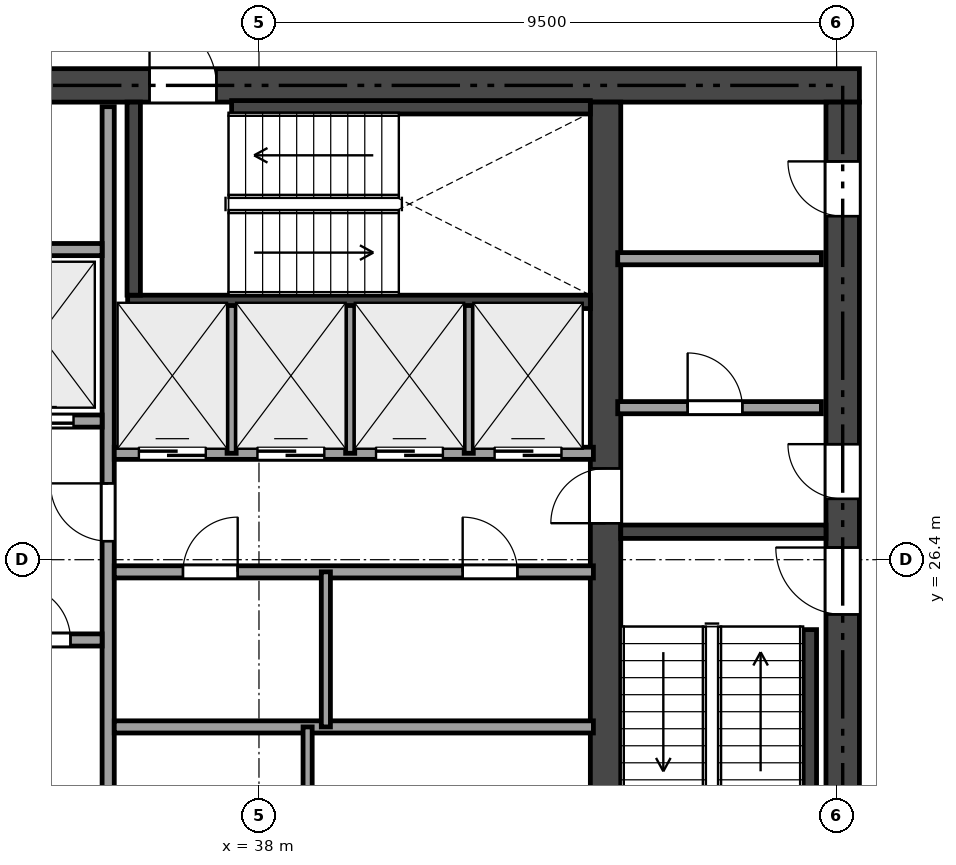
"""IFC4 building model, lengths in metres.
Left out: names, types, materials, properties, quantities, classifications, styles, units other than length and angle.
Written with IfcOpenShell. Run it as: python <this file> out.ifc"""

import sys

from ifc_helpers import new_model, si_unit, direction, frame, frame_2d, origin, place, context, subcontext, project, spatial, rectangle, extrude, element, fill, save


model = new_model("IFC4")
c1 = context("Model", 3, precision=1e-05, world=origin(), true_north=direction((0.0, 1.0)))
c2 = subcontext(c1, "Body", "Model", "MODEL_VIEW")
j1 = project(units=[si_unit("LENGTHUNIT", "METRE"), si_unit("PLANEANGLEUNIT", "RADIAN")], contexts=[c1])
p1 = place(None, origin())
s1 = spatial("IfcSite", under=j1, at=p1, CompositionType="ELEMENT")
p2 = place(p1, origin())
s2 = spatial("IfcBuilding", under=s1, at=p2, CompositionType="ELEMENT")
p3 = place(p2, frame((0.0, 0.0, 231.9)))
s3 = spatial("IfcBuildingStorey", under=s2, at=p3, CompositionType="ELEMENT", Elevation=231.9)
p4 = place(p3, frame((26.525, 34.2, 0.0), z_axis=(0.0, 0.0, 1.0), x_axis=(1.0, 0.0, 0.0)))
e1 = element("IfcWall", 1, at=p4, inside=s3, PredefinedType="SHEAR", context=c2, shape_type="SweptSolid", body=[
    extrude(rectangle(XDim=21.35, YDim=0.55, at=frame_2d((10.675, 0.0))), origin(), (0.0, 0.0, 1.0), 3.18),
])
p5 = place(p4, frame((9.675, 0.0, 0.0)))
e2 = element("IfcOpeningElement", 2, at=p5, cuts=e1, PredefinedType="OPENING", context=c2, shape_type="SweptSolid", body=[
    extrude(rectangle(XDim=1.1, YDim=2.15, at=frame_2d((0.55, 1.075))), frame((0.0, 0.285, 0.0), z_axis=(0.0, -1.0, 0.0), x_axis=(1.0, 0.0, 0.0)), (0.0, 0.0, 1.0), 0.57),
])
p6 = place(p4, frame((1.925, 0.0, 0.0)))
e3 = element("IfcOpeningElement", 3, at=p6, cuts=e1, PredefinedType="OPENING", context=c2, shape_type="SweptSolid", body=[
    extrude(rectangle(XDim=0.9, YDim=2.1, at=frame_2d((0.45, 1.05))), frame((0.0, 0.285, 0.0), z_axis=(0.0, -1.0, 0.0), x_axis=(1.0, 0.0, 0.0)), (0.0, 0.0, 1.0), 0.57),
])
p7 = place(p4, frame((6.225, 0.0, 0.0)))
e4 = element("IfcOpeningElement", 4, at=p7, cuts=e1, PredefinedType="OPENING", context=c2, shape_type="SweptSolid", body=[
    extrude(rectangle(XDim=0.9, YDim=2.1, at=frame_2d((0.45, 1.05))), frame((0.0, 0.285, 0.0), z_axis=(0.0, -1.0, 0.0), x_axis=(1.0, 0.0, 0.0)), (0.0, 0.0, 1.0), 0.57),
])
p8 = place(p3, frame((47.6, 18.875, 0.0), z_axis=(0.0, 0.0, 1.0), x_axis=(0.0, 1.0, 0.0)))
e5 = element("IfcWall", 5, at=p8, inside=s3, PredefinedType="SHEAR", context=c2, shape_type="SweptSolid", body=[
    extrude(rectangle(XDim=15.05, YDim=0.55, at=frame_2d((7.525, 0.0))), origin(), (0.0, 0.0, 1.0), 3.18),
])
p9 = place(p8, frame((6.625, 0.0, 0.0)))
e6 = element("IfcOpeningElement", 6, at=p9, cuts=e5, PredefinedType="OPENING", context=c2, shape_type="SweptSolid", body=[
    extrude(rectangle(XDim=1.1, YDim=2.15, at=frame_2d((0.55, 1.075))), frame((0.0, 0.285, 0.0), z_axis=(0.0, -1.0, 0.0), x_axis=(1.0, 0.0, 0.0)), (0.0, 0.0, 1.0), 0.57),
])
p10 = place(p8, frame((8.525, 0.0, 0.0)))
e7 = element("IfcOpeningElement", 7, at=p10, cuts=e5, PredefinedType="OPENING", context=c2, shape_type="SweptSolid", body=[
    extrude(rectangle(XDim=0.9, YDim=2.1, at=frame_2d((0.45, 1.05))), frame((0.0, 0.285, 0.0), z_axis=(0.0, -1.0, 0.0), x_axis=(1.0, 0.0, 0.0)), (0.0, 0.0, 1.0), 0.57),
])
p11 = place(p8, frame((13.175, 0.0, 0.0)))
e8 = element("IfcOpeningElement", 8, at=p11, cuts=e5, PredefinedType="OPENING", context=c2, shape_type="SweptSolid", body=[
    extrude(rectangle(XDim=0.9, YDim=2.1, at=frame_2d((0.45, 1.05))), frame((0.0, 0.285, 0.0), z_axis=(0.0, -1.0, 0.0), x_axis=(1.0, 0.0, 0.0)), (0.0, 0.0, 1.0), 0.57),
])
p12 = place(p3, frame((43.7, 18.875, 0.0), z_axis=(0.0, 0.0, 1.0), x_axis=(0.0, 1.0, 0.0)))
e9 = element("IfcWall", 9, at=p12, inside=s3, PredefinedType="SHEAR", context=c2, shape_type="SweptSolid", body=[
    extrude(rectangle(XDim=15.05, YDim=0.5, at=frame_2d((7.525, 0.0))), origin(), (0.0, 0.0, 1.0), 3.18),
])
p13 = place(p12, frame((8.125, 0.0, 0.0)))
e10 = element("IfcOpeningElement", 10, at=p13, cuts=e9, PredefinedType="OPENING", context=c2, shape_type="SweptSolid", body=[
    extrude(rectangle(XDim=0.9, YDim=2.1, at=frame_2d((0.45, 1.05))), frame((0.0, 0.26, 0.0), z_axis=(0.0, -1.0, 0.0), x_axis=(1.0, 0.0, 0.0)), (0.0, 0.0, 1.0), 0.52),
])
p14 = place(p3, frame((43.95, 26.86, 0.0), z_axis=(0.0, 0.0, 1.0), x_axis=(1.0, 0.0, 0.0)))
e11 = element("IfcWall", 11, at=p14, inside=s3, PredefinedType="SHEAR", context=c2, shape_type="SweptSolid", body=[
    extrude(rectangle(XDim=3.375, YDim=0.22, at=frame_2d((1.688, 0.0))), origin(), (0.0, 0.0, 1.0), 3.18),
])
p15 = place(p3, frame((47.06, 19.35, 0.0), z_axis=(0.0, 0.0, 1.0), x_axis=(0.0, 1.0, 0.0)))
e12 = element("IfcWall", 12, at=p15, inside=s3, PredefinedType="SHEAR", context=c2, shape_type="SweptSolid", body=[
    extrude(rectangle(XDim=5.9, YDim=0.22, at=frame_2d((2.95, 0.0))), origin(), (0.0, 0.0, 1.0), 3.18),
])
p16 = place(p3, frame((35.84, 30.64, 0.0), z_axis=(0.0, 0.0, 1.0), x_axis=(1.0, 0.0, 0.0)))
e13 = element("IfcWall", 13, at=p16, inside=s3, PredefinedType="SHEAR", context=c2, shape_type="SweptSolid", body=[
    extrude(rectangle(XDim=7.61, YDim=0.22, at=frame_2d((3.805, 0.0))), origin(), (0.0, 0.0, 1.0), 3.18),
])
p17 = place(p3, frame((35.94, 30.75, 0.0), z_axis=(0.0, 0.0, 1.0), x_axis=(0.0, 1.0, 0.0)))
e14 = element("IfcWall", 14, at=p17, inside=s3, PredefinedType="SHEAR", context=c2, shape_type="SweptSolid", body=[
    extrude(rectangle(XDim=3.175, YDim=0.22, at=frame_2d((1.587, 0.0))), origin(), (0.0, 0.0, 1.0), 3.18),
])
p18 = place(p3, frame((37.55, 33.84, 0.0), z_axis=(0.0, 0.0, 1.0), x_axis=(1.0, 0.0, 0.0)))
e15 = element("IfcWall", 15, at=p18, inside=s3, PredefinedType="SHEAR", context=c2, shape_type="SweptSolid", body=[
    extrude(rectangle(XDim=5.9, YDim=0.22, at=frame_2d((2.95, 0.0))), origin(), (0.0, 0.0, 1.0), 3.18),
])
p19 = place(p3, frame((43.9, 28.9, 0.0), z_axis=(0.0, 0.0, 1.0), x_axis=(1.0, 0.0, 0.0)))
e16 = element("IfcWall", 16, at=p19, inside=s3, PredefinedType="SOLIDWALL", context=c2, shape_type="SweptSolid", body=[
    extrude(rectangle(XDim=3.35, YDim=0.2, at=frame_2d((1.675, 0.0))), origin(), (0.0, 0.0, 1.0), 3.18),
])
p20 = place(p19, frame((1.15, 0.0, 0.0)))
e17 = element("IfcOpeningElement", 17, at=p20, cuts=e16, PredefinedType="OPENING", context=c2, shape_type="SweptSolid", body=[
    extrude(rectangle(XDim=0.9, YDim=2.1, at=frame_2d((0.45, 1.05))), frame((0.0, 0.11, 0.0), z_axis=(0.0, -1.0, 0.0), x_axis=(1.0, 0.0, 0.0)), (0.0, 0.0, 1.0), 0.22),
])
p21 = place(p3, frame((43.9, 31.35, 0.0), z_axis=(0.0, 0.0, 1.0), x_axis=(1.0, 0.0, 0.0)))
e18 = element("IfcWall", 18, at=p21, inside=s3, PredefinedType="SOLIDWALL", context=c2, shape_type="SweptSolid", body=[
    extrude(rectangle(XDim=3.35, YDim=0.2, at=frame_2d((1.675, 0.0))), origin(), (0.0, 0.0, 1.0), 2.809),
])
p22 = place(p3, frame((35.52, 18.95, 0.0), z_axis=(0.0, 0.0, 1.0), x_axis=(0.0, 1.0, 0.0)))
e19 = element("IfcWall", 19, at=p22, inside=s3, PredefinedType="SOLIDWALL", context=c2, shape_type="SweptSolid", body=[
    extrude(rectangle(XDim=14.9, YDim=0.2, at=frame_2d((7.45, 0.0))), origin(), (0.0, 0.0, 1.0), 2.701),
])
p23 = place(p22, frame((7.755, 0.0, 0.0)))
e20 = element("IfcOpeningElement", 20, at=p23, cuts=e19, PredefinedType="OPENING", context=c2, shape_type="SweptSolid", body=[
    extrude(rectangle(XDim=0.95, YDim=2.15, at=frame_2d((0.475, 1.075))), frame((0.0, 0.11, 0.0), z_axis=(0.0, -1.0, 0.0), x_axis=(1.0, 0.0, 0.0)), (0.0, 0.0, 1.0), 0.22),
])
p24 = place(p22, frame((0.6, 0.0, 0.0)))
e21 = element("IfcOpeningElement", 21, at=p24, cuts=e19, PredefinedType="OPENING", context=c2, shape_type="SweptSolid", body=[
    extrude(rectangle(XDim=0.9, YDim=2.1, at=frame_2d((0.45, 1.05))), frame((0.0, 0.11, 0.0), z_axis=(0.0, -1.0, 0.0), x_axis=(1.0, 0.0, 0.0)), (0.0, 0.0, 1.0), 0.22),
])
p25 = place(p3, frame((31.0, 28.68, 0.0), z_axis=(0.0, 0.0, 1.0), x_axis=(1.0, 0.0, 0.0)))
e22 = element("IfcWall", 22, at=p25, inside=s3, PredefinedType="SOLIDWALL", context=c2, shape_type="SweptSolid", body=[
    extrude(rectangle(XDim=4.42, YDim=0.2, at=frame_2d((2.21, 0.0))), origin(), (0.0, 0.0, 1.0), 3.18),
])
p26 = place(p25, frame((0.6, 0.0, 0.0)))
e23 = element("IfcOpeningElement", 23, at=p26, cuts=e22, PredefinedType="OPENING", context=c2, shape_type="SweptSolid", body=[
    extrude(rectangle(XDim=1.1, YDim=2.15, at=frame_2d((0.55, 1.075))), frame((0.0, 0.11, 0.0), z_axis=(0.0, -1.0, 0.0), x_axis=(1.0, 0.0, 0.0)), (0.0, 0.0, 1.0), 0.22),
])
p27 = place(p25, frame((2.85, 0.0, 0.0)))
e24 = element("IfcOpeningElement", 24, at=p27, cuts=e22, PredefinedType="OPENING", context=c2, shape_type="SweptSolid", body=[
    extrude(rectangle(XDim=1.1, YDim=2.15, at=frame_2d((0.55, 1.075))), frame((0.0, 0.11, 0.0), z_axis=(0.0, -1.0, 0.0), x_axis=(1.0, 0.0, 0.0)), (0.0, 0.0, 1.0), 0.22),
])
p28 = place(p3, frame((31.0, 31.5, 0.0), z_axis=(0.0, 0.0, 1.0), x_axis=(1.0, 0.0, 0.0)))
e25 = element("IfcWall", 25, at=p28, inside=s3, PredefinedType="SOLIDWALL", context=c2, shape_type="SweptSolid", body=[
    extrude(rectangle(XDim=4.42, YDim=0.2, at=frame_2d((2.21, 0.0))), origin(), (0.0, 0.0, 1.0), 3.18),
])
p29 = place(p3, frame((31.0, 25.08, 0.0), z_axis=(0.0, 0.0, 1.0), x_axis=(1.0, 0.0, 0.0)))
e26 = element("IfcWall", 26, at=p29, inside=s3, PredefinedType="SOLIDWALL", context=c2, shape_type="SweptSolid", body=[
    extrude(rectangle(XDim=4.42, YDim=0.2, at=frame_2d((2.21, 0.0))), origin(), (0.0, 0.0, 1.0), 3.18),
])
p30 = place(p29, frame((3.0, 0.0, 0.0)))
e27 = element("IfcOpeningElement", 27, at=p30, cuts=e26, PredefinedType="OPENING", context=c2, shape_type="SweptSolid", body=[
    extrude(rectangle(XDim=0.9, YDim=2.1, at=frame_2d((0.45, 1.05))), frame((0.0, 0.11, 0.0), z_axis=(0.0, -1.0, 0.0), x_axis=(1.0, 0.0, 0.0)), (0.0, 0.0, 1.0), 0.22),
])
p31 = place(p29, frame((0.62, 0.0, 0.0)))
e28 = element("IfcOpeningElement", 28, at=p31, cuts=e26, PredefinedType="OPENING", context=c2, shape_type="SweptSolid", body=[
    extrude(rectangle(XDim=1.2, YDim=2.15, at=frame_2d((0.6, 1.075))), frame((0.0, 0.11, 0.0), z_axis=(0.0, -1.0, 0.0), x_axis=(1.0, 0.0, 0.0)), (0.0, 0.0, 1.0), 0.22),
])
p32 = place(p3, frame((35.62, 28.15, 0.0), z_axis=(0.0, 0.0, 1.0), x_axis=(1.0, 0.0, 0.0)))
e29 = element("IfcWall", 29, at=p32, inside=s3, PredefinedType="SOLIDWALL", context=c2, shape_type="SweptSolid", body=[
    extrude(rectangle(XDim=7.88, YDim=0.2, at=frame_2d((3.94, 0.0))), origin(), (0.0, 0.0, 1.0), 3.18),
])
p33 = place(p32, frame((0.405, 0.0, 0.0)))
e30 = element("IfcOpeningElement", 30, at=p33, cuts=e29, PredefinedType="OPENING", context=c2, shape_type="SweptSolid", body=[
    extrude(rectangle(XDim=1.1, YDim=2.15, at=frame_2d((0.55, 1.075))), frame((0.0, 0.11, 0.0), z_axis=(0.0, -1.0, 0.0), x_axis=(1.0, 0.0, 0.0)), (0.0, 0.0, 1.0), 0.22),
])
p34 = place(p32, frame((2.355, 0.0, 0.0)))
e31 = element("IfcOpeningElement", 31, at=p34, cuts=e29, PredefinedType="OPENING", context=c2, shape_type="SweptSolid", body=[
    extrude(rectangle(XDim=1.1, YDim=2.15, at=frame_2d((0.55, 1.075))), frame((0.0, 0.11, 0.0), z_axis=(0.0, -1.0, 0.0), x_axis=(1.0, 0.0, 0.0)), (0.0, 0.0, 1.0), 0.22),
])
p35 = place(p32, frame((4.305, 0.0, 0.0)))
e32 = element("IfcOpeningElement", 32, at=p35, cuts=e29, PredefinedType="OPENING", context=c2, shape_type="SweptSolid", body=[
    extrude(rectangle(XDim=1.1, YDim=2.15, at=frame_2d((0.55, 1.075))), frame((0.0, 0.11, 0.0), z_axis=(0.0, -1.0, 0.0), x_axis=(1.0, 0.0, 0.0)), (0.0, 0.0, 1.0), 0.22),
])
p36 = place(p32, frame((6.255, 0.0, 0.0)))
e33 = element("IfcOpeningElement", 33, at=p36, cuts=e29, PredefinedType="OPENING", context=c2, shape_type="SweptSolid", body=[
    extrude(rectangle(XDim=1.1, YDim=2.15, at=frame_2d((0.55, 1.075))), frame((0.0, 0.11, 0.0), z_axis=(0.0, -1.0, 0.0), x_axis=(1.0, 0.0, 0.0)), (0.0, 0.0, 1.0), 0.22),
])
p37 = place(p3, frame((35.62, 26.2, 0.0), z_axis=(0.0, 0.0, 1.0), x_axis=(1.0, 0.0, 0.0)))
e34 = element("IfcWall", 34, at=p37, inside=s3, PredefinedType="SOLIDWALL", context=c2, shape_type="SweptSolid", body=[
    extrude(rectangle(XDim=7.88, YDim=0.2, at=frame_2d((3.94, 0.0))), origin(), (0.0, 0.0, 1.0), 3.18),
])
p38 = place(p37, frame((1.13, 0.0, 0.0)))
e35 = element("IfcOpeningElement", 35, at=p38, cuts=e34, PredefinedType="OPENING", context=c2, shape_type="SweptSolid", body=[
    extrude(rectangle(XDim=0.9, YDim=2.1, at=frame_2d((0.45, 1.05))), frame((0.0, 0.11, 0.0), z_axis=(0.0, -1.0, 0.0), x_axis=(1.0, 0.0, 0.0)), (0.0, 0.0, 1.0), 0.22),
])
p39 = place(p37, frame((5.73, 0.0, 0.0)))
e36 = element("IfcOpeningElement", 36, at=p39, cuts=e34, PredefinedType="OPENING", context=c2, shape_type="SweptSolid", body=[
    extrude(rectangle(XDim=0.9, YDim=2.1, at=frame_2d((0.45, 1.05))), frame((0.0, 0.11, 0.0), z_axis=(0.0, -1.0, 0.0), x_axis=(1.0, 0.0, 0.0)), (0.0, 0.0, 1.0), 0.22),
])
p40 = place(p3, frame((35.62, 23.65, 0.0), z_axis=(0.0, 0.0, 1.0), x_axis=(1.0, 0.0, 0.0)))
e37 = element("IfcWall", 37, at=p40, inside=s3, PredefinedType="SOLIDWALL", context=c2, shape_type="SweptSolid", body=[
    extrude(rectangle(XDim=7.88, YDim=0.2, at=frame_2d((3.94, 0.0))), origin(), (0.0, 0.0, 1.0), 2.701),
])
for number, where, z_axis, x_axis in (
    (38, (37.55, 28.15, 0.0), (0.0, 0.0, 1.0), (0.0, 1.0, 0.0)),
    (39, (39.5, 28.15, 0.0), (0.0, 0.0, 1.0), (0.0, 1.0, 0.0)),
    (40, (41.45, 28.15, 0.0), (0.0, 0.0, 1.0), (0.0, 1.0, 0.0)),
):
    element("IfcWall", number, at=place(p3, frame(where, z_axis=z_axis, x_axis=x_axis)), inside=s3, PredefinedType="PARTITIONING", context=c2, shape_type="SweptSolid", body=[
        extrude(rectangle(XDim=2.43, YDim=0.15, at=frame_2d((1.215, 0.0))), origin(), (0.0, 0.0, 1.0), 3.18),
    ])
p41 = place(p3, frame((39.1, 23.65, 0.0), z_axis=(0.0, 0.0, 1.0), x_axis=(0.0, 1.0, 0.0)))
e41 = element("IfcWall", 41, at=p41, inside=s3, PredefinedType="PARTITIONING", context=c2, shape_type="SweptSolid", body=[
    extrude(rectangle(XDim=2.55, YDim=0.15, at=frame_2d((1.275, 0.0))), origin(), (0.0, 0.0, 1.0), 2.701),
])
p42 = place(p3, frame((38.8, 21.25, 0.0), z_axis=(0.0, 0.0, 1.0), x_axis=(0.0, 1.0, 0.0)))
e42 = element("IfcWall", 42, at=p42, inside=s3, PredefinedType="PARTITIONING", context=c2, shape_type="SweptSolid", body=[
    extrude(rectangle(XDim=2.4, YDim=0.15, at=frame_2d((1.2, 0.0))), origin(), (0.0, 0.0, 1.0), 2.701),
])
p43 = place(p9, origin())
e43 = element("IfcDoor", 43, at=p43, inside=s3, OperationType="SINGLE_SWING_RIGHT", PredefinedType="DOOR", context=c2, shape_type="SweptSolid", body=[
    extrude(rectangle(XDim=1.1, YDim=2.15, at=frame_2d((0.55, 1.075))), frame((0.0, 0.025, 0.0), z_axis=(0.0, -1.0, 0.0), x_axis=(1.0, 0.0, 0.0)), (0.0, 0.0, 1.0), 0.05),
])
fill(e6, e43)
p44 = place(p5, origin())
e44 = element("IfcDoor", 44, at=p44, inside=s3, OperationType="SINGLE_SWING_LEFT", PredefinedType="DOOR", context=c2, shape_type="SweptSolid", body=[
    extrude(rectangle(XDim=1.1, YDim=2.15, at=frame_2d((0.55, 1.075))), frame((0.0, 0.025, 0.0), z_axis=(0.0, -1.0, 0.0), x_axis=(1.0, 0.0, 0.0)), (0.0, 0.0, 1.0), 0.05),
])
fill(e2, e44)
p45 = place(p23, origin())
e45 = element("IfcDoor", 45, at=p45, inside=s3, OperationType="SINGLE_SWING_RIGHT", PredefinedType="DOOR", context=c2, shape_type="SweptSolid", body=[
    extrude(rectangle(XDim=0.95, YDim=2.15, at=frame_2d((0.475, 1.075))), frame((0.0, 0.025, 0.0), z_axis=(0.0, -1.0, 0.0), x_axis=(1.0, 0.0, 0.0)), (0.0, 0.0, 1.0), 0.05),
])
fill(e20, e45)
p46 = place(p13, origin())
e46 = element("IfcDoor", 46, at=p46, inside=s3, OperationType="SINGLE_SWING_LEFT", PredefinedType="DOOR", context=c2, shape_type="SweptSolid", body=[
    extrude(rectangle(XDim=0.9, YDim=2.1, at=frame_2d((0.45, 1.05))), frame((0.0, 0.025, 0.0), z_axis=(0.0, -1.0, 0.0), x_axis=(1.0, 0.0, 0.0)), (0.0, 0.0, 1.0), 0.05),
])
fill(e10, e46)
p47 = place(p10, origin())
e47 = element("IfcDoor", 47, at=p47, inside=s3, OperationType="SINGLE_SWING_RIGHT", PredefinedType="DOOR", context=c2, shape_type="SweptSolid", body=[
    extrude(rectangle(XDim=0.9, YDim=2.1, at=frame_2d((0.45, 1.05))), frame((0.0, 0.025, 0.0), z_axis=(0.0, -1.0, 0.0), x_axis=(1.0, 0.0, 0.0)), (0.0, 0.0, 1.0), 0.05),
])
fill(e7, e47)
p48 = place(p20, origin())
e48 = element("IfcDoor", 48, at=p48, inside=s3, OperationType="SINGLE_SWING_LEFT", PredefinedType="DOOR", context=c2, shape_type="SweptSolid", body=[
    extrude(rectangle(XDim=0.9, YDim=2.1, at=frame_2d((0.45, 1.05))), frame((0.0, 0.025, 0.0), z_axis=(0.0, -1.0, 0.0), x_axis=(1.0, 0.0, 0.0)), (0.0, 0.0, 1.0), 0.05),
])
fill(e17, e48)
p49 = place(p11, origin())
e49 = element("IfcDoor", 49, at=p49, inside=s3, OperationType="SINGLE_SWING_RIGHT", PredefinedType="DOOR", context=c2, shape_type="SweptSolid", body=[
    extrude(rectangle(XDim=0.9, YDim=2.1, at=frame_2d((0.45, 1.05))), frame((0.0, 0.025, 0.0), z_axis=(0.0, -1.0, 0.0), x_axis=(1.0, 0.0, 0.0)), (0.0, 0.0, 1.0), 0.05),
])
fill(e8, e49)
p50 = place(p30, origin())
e50 = element("IfcDoor", 50, at=p50, inside=s3, OperationType="SINGLE_SWING_LEFT", PredefinedType="DOOR", context=c2, shape_type="SweptSolid", body=[
    extrude(rectangle(XDim=0.9, YDim=2.1, at=frame_2d((0.45, 1.05))), frame((0.0, 0.025, 0.0), z_axis=(0.0, -1.0, 0.0), x_axis=(1.0, 0.0, 0.0)), (0.0, 0.0, 1.0), 0.05),
])
fill(e27, e50)
p51 = place(p38, origin())
e51 = element("IfcDoor", 51, at=p51, inside=s3, OperationType="SINGLE_SWING_RIGHT", PredefinedType="DOOR", context=c2, shape_type="SweptSolid", body=[
    extrude(rectangle(XDim=0.9, YDim=2.1, at=frame_2d((0.45, 1.05))), frame((0.0, 0.025, 0.0), z_axis=(0.0, -1.0, 0.0), x_axis=(1.0, 0.0, 0.0)), (0.0, 0.0, 1.0), 0.05),
])
fill(e35, e51)
p52 = place(p39, origin())
e52 = element("IfcDoor", 52, at=p52, inside=s3, OperationType="SINGLE_SWING_LEFT", PredefinedType="DOOR", context=c2, shape_type="SweptSolid", body=[
    extrude(rectangle(XDim=0.9, YDim=2.1, at=frame_2d((0.45, 1.05))), frame((0.0, 0.025, 0.0), z_axis=(0.0, -1.0, 0.0), x_axis=(1.0, 0.0, 0.0)), (0.0, 0.0, 1.0), 0.05),
])
fill(e36, e52)
p53 = place(p27, origin())
e53 = element("IfcDoor", 53, at=p53, inside=s3, OperationType="SLIDING_TO_LEFT", PredefinedType="DOOR", context=c2, shape_type="SweptSolid", body=[
    extrude(rectangle(XDim=1.1, YDim=2.15, at=frame_2d((0.55, 1.075))), frame((0.0, 0.025, 0.0), z_axis=(0.0, -1.0, 0.0), x_axis=(1.0, 0.0, 0.0)), (0.0, 0.0, 1.0), 0.05),
])
fill(e24, e53)
p54 = place(p33, origin())
e54 = element("IfcDoor", 54, at=p54, inside=s3, OperationType="SLIDING_TO_LEFT", PredefinedType="DOOR", context=c2, shape_type="SweptSolid", body=[
    extrude(rectangle(XDim=1.1, YDim=2.15, at=frame_2d((0.55, 1.075))), frame((0.0, 0.025, 0.0), z_axis=(0.0, -1.0, 0.0), x_axis=(1.0, 0.0, 0.0)), (0.0, 0.0, 1.0), 0.05),
])
fill(e30, e54)
p55 = place(p34, origin())
e55 = element("IfcDoor", 55, at=p55, inside=s3, OperationType="SLIDING_TO_LEFT", PredefinedType="DOOR", context=c2, shape_type="SweptSolid", body=[
    extrude(rectangle(XDim=1.1, YDim=2.15, at=frame_2d((0.55, 1.075))), frame((0.0, 0.025, 0.0), z_axis=(0.0, -1.0, 0.0), x_axis=(1.0, 0.0, 0.0)), (0.0, 0.0, 1.0), 0.05),
])
fill(e31, e55)
p56 = place(p35, origin())
e56 = element("IfcDoor", 56, at=p56, inside=s3, OperationType="SLIDING_TO_LEFT", PredefinedType="DOOR", context=c2, shape_type="SweptSolid", body=[
    extrude(rectangle(XDim=1.1, YDim=2.15, at=frame_2d((0.55, 1.075))), frame((0.0, 0.025, 0.0), z_axis=(0.0, -1.0, 0.0), x_axis=(1.0, 0.0, 0.0)), (0.0, 0.0, 1.0), 0.05),
])
fill(e32, e56)
p57 = place(p36, origin())
e57 = element("IfcDoor", 57, at=p57, inside=s3, OperationType="SLIDING_TO_LEFT", PredefinedType="DOOR", context=c2, shape_type="SweptSolid", body=[
    extrude(rectangle(XDim=1.1, YDim=2.15, at=frame_2d((0.55, 1.075))), frame((0.0, 0.025, 0.0), z_axis=(0.0, -1.0, 0.0), x_axis=(1.0, 0.0, 0.0)), (0.0, 0.0, 1.0), 0.05),
])
fill(e33, e57)
save(model, sys.argv[1])
